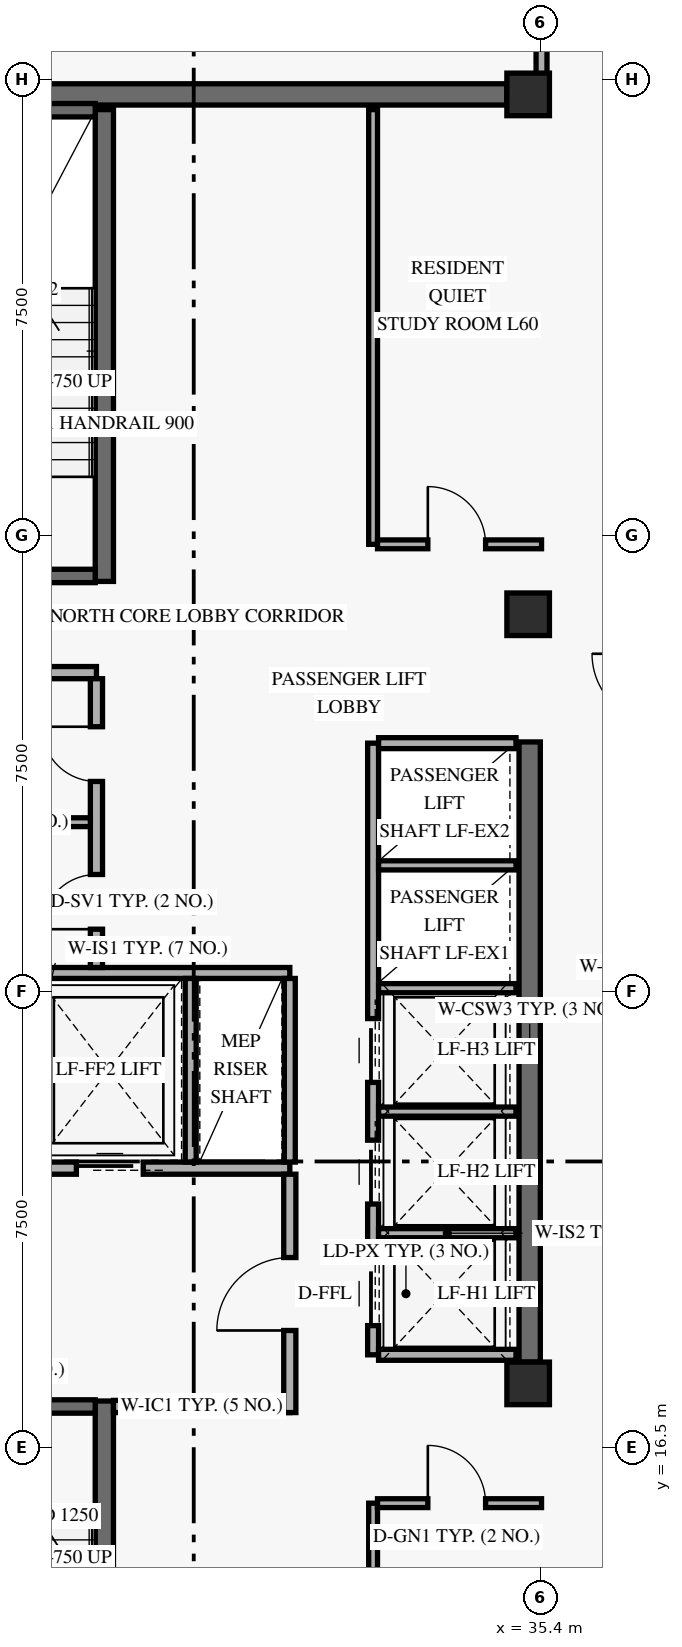
"""IFC4 building model, lengths in metres.
Left out: names, types, materials, properties, quantities, classifications, styles, units other than length and angle.
Written with IfcOpenShell. Run it as: python <this file> out.ifc"""

import sys

from ifc_helpers import new_model, si_unit, direction, frame, frame_2d, origin, origin_2d, place, context, subcontext, project, spatial, rectangle, extrude, element, fill, save


model = new_model("IFC4")
c1 = context("Model", 3, precision=1e-05, world=origin(), true_north=direction((0.0, 1.0)))
c2 = subcontext(c1, "Body", "Model", "MODEL_VIEW")
j1 = project(units=[si_unit("LENGTHUNIT", "METRE"), si_unit("PLANEANGLEUNIT", "RADIAN")], contexts=[c1])
p1 = place(None, origin())
s1 = spatial("IfcSite", under=j1, at=p1, CompositionType="ELEMENT")
p2 = place(p1, origin())
s2 = spatial("IfcBuilding", under=s1, at=p2, CompositionType="ELEMENT")
p3 = place(p2, frame((0.0, 0.0, 231.0)))
s3 = spatial("IfcBuildingStorey", under=s2, at=p3, CompositionType="ELEMENT", Elevation=231.0)
p4 = place(p3, frame((35.225, 17.9, 0.0), z_axis=(0.0, 0.0, 1.0), x_axis=(0.0, 1.0, 0.0)))
e1 = element("IfcWall", 1, at=p4, inside=s3, PredefinedType="SHEAR", context=c2, shape_type="SweptSolid", body=[
    extrude(rectangle(XDim=10.2, YDim=0.35, at=frame_2d((5.1, 0.0))), origin(), (0.0, 0.0, 1.0), 3.421),
])
p5 = place(p3, frame((24.55, 38.75, 0.0), z_axis=(0.0, 0.0, 1.0), x_axis=(1.0, 0.0, 0.0)))
e2 = element("IfcWall", 2, at=p5, inside=s3, PredefinedType="SHEAR", context=c2, shape_type="SweptSolid", body=[
    extrude(rectangle(XDim=10.3, YDim=0.35, at=frame_2d((5.15, 0.0))), origin(), (0.0, 0.0, 1.0), 3.96),
])
p6 = place(p3, frame((28.23, 9.5, 0.0), z_axis=(0.0, 0.0, 1.0), x_axis=(0.0, 1.0, 0.0)))
e3 = element("IfcWall", 3, at=p6, inside=s3, PredefinedType="SHEAR", context=c2, shape_type="SweptSolid", body=[
    extrude(rectangle(XDim=7.76, YDim=0.3, at=frame_2d((3.88, 0.0))), origin(), (0.0, 0.0, 1.0), 3.96),
])
p7 = place(p3, frame((24.92, 17.17, 0.0), z_axis=(0.0, 0.0, 1.0), x_axis=(1.0, 0.0, 0.0)))
e4 = element("IfcWall", 4, at=p7, inside=s3, PredefinedType="SHEAR", context=c2, shape_type="SweptSolid", body=[
    extrude(rectangle(XDim=3.16, YDim=0.22, at=frame_2d((1.58, 0.0))), origin(), (0.0, 0.0, 1.0), 3.96),
])
p8 = place(p7, frame((0.78, 0.0, 0.0)))
e5 = element("IfcOpeningElement", 5, at=p8, cuts=e4, PredefinedType="OPENING", context=c2, shape_type="SweptSolid", body=[
    extrude(rectangle(XDim=1.05, YDim=2.15, at=frame_2d((0.525, 1.075))), frame((0.0, 0.12, 0.0), z_axis=(0.0, -1.0, 0.0), x_axis=(1.0, 0.0, 0.0)), (0.0, 0.0, 1.0), 0.24),
])
p9 = place(p3, frame((28.23, 30.74, 0.0), z_axis=(0.0, 0.0, 1.0), x_axis=(0.0, 1.0, 0.0)))
e6 = element("IfcWall", 6, at=p9, inside=s3, PredefinedType="SHEAR", context=c2, shape_type="SweptSolid", body=[
    extrude(rectangle(XDim=7.76, YDim=0.3, at=frame_2d((3.88, 0.0))), origin(), (0.0, 0.0, 1.0), 3.96),
])
p10 = place(p3, frame((24.92, 30.83, 0.0), z_axis=(0.0, 0.0, 1.0), x_axis=(1.0, 0.0, 0.0)))
e7 = element("IfcWall", 7, at=p10, inside=s3, PredefinedType="SHEAR", context=c2, shape_type="SweptSolid", body=[
    extrude(rectangle(XDim=3.16, YDim=0.22, at=frame_2d((1.58, 0.0))), origin(), (0.0, 0.0, 1.0), 3.96),
])
p11 = place(p10, frame((0.78, 0.0, 0.0)))
e8 = element("IfcOpeningElement", 8, at=p11, cuts=e7, PredefinedType="OPENING", context=c2, shape_type="SweptSolid", body=[
    extrude(rectangle(XDim=1.05, YDim=2.15, at=frame_2d((0.525, 1.075))), frame((0.0, 0.12, 0.0), z_axis=(0.0, -1.0, 0.0), x_axis=(1.0, 0.0, 0.0)), (0.0, 0.0, 1.0), 0.24),
])
p12 = place(p3, frame((24.92, 38.49, 0.0), z_axis=(0.0, 0.0, 1.0), x_axis=(1.0, 0.0, 0.0)))
e9 = element("IfcWall", 9, at=p12, inside=s3, PredefinedType="SHEAR", context=c2, shape_type="SweptSolid", body=[
    extrude(rectangle(XDim=3.16, YDim=0.22, at=frame_2d((1.58, 0.0))), origin(), (0.0, 0.0, 1.0), 3.96),
])
for number, where, z_axis, x_axis in (
    (10, (35.2, 17.55, 0.0), (0.0, 0.0, 1.0), (1.0, 0.0, 0.0)),
    (11, (35.2, 30.2, 0.0), (0.0, 0.0, 1.0), (1.0, 0.0, 0.0)),
    (12, (35.2, 38.75, 0.0), (0.0, 0.0, 1.0), (1.0, 0.0, 0.0)),
):
    element("IfcColumn", number, at=place(p3, frame(where, z_axis=z_axis, x_axis=x_axis)), inside=s3, PredefinedType="COLUMN", context=c2, shape_type="SweptSolid", body=[
        extrude(rectangle(XDim=0.7, YDim=0.7, at=origin_2d()), origin(), (0.0, 0.0, 1.0), 4.2),
    ])
p13 = place(p3, frame((24.45, 21.09, 0.0), z_axis=(0.0, 0.0, 1.0), x_axis=(1.0, 0.0, 0.0)))
e13 = element("IfcWall", 13, at=p13, inside=s3, PredefinedType="STANDARD", context=c2, shape_type="SweptSolid", body=[
    extrude(rectangle(XDim=6.83, YDim=0.2, at=frame_2d((3.415, 0.0))), origin(), (0.0, 0.0, 1.0), 3.96),
])
p14 = place(p13, frame((0.72, 0.0, 0.0)))
e14 = element("IfcOpeningElement", 14, at=p14, cuts=e13, PredefinedType="OPENING", context=c2, shape_type="SweptSolid", body=[
    extrude(rectangle(XDim=1.1, YDim=2.2, at=frame_2d((0.55, 1.1))), frame((0.0, 0.11, 0.0), z_axis=(0.0, -1.0, 0.0), x_axis=(1.0, 0.0, 0.0)), (0.0, 0.0, 1.0), 0.22),
])
p15 = place(p13, frame((3.32, 0.0, 0.0)))
e15 = element("IfcOpeningElement", 15, at=p15, cuts=e13, PredefinedType="OPENING", context=c2, shape_type="SweptSolid", body=[
    extrude(rectangle(XDim=1.1, YDim=2.2, at=frame_2d((0.55, 1.1))), frame((0.0, 0.11, 0.0), z_axis=(0.0, -1.0, 0.0), x_axis=(1.0, 0.0, 0.0)), (0.0, 0.0, 1.0), 0.22),
])
p16 = place(p3, frame((28.38, 17.17, 0.0), z_axis=(0.0, 0.0, 1.0), x_axis=(1.0, 0.0, 0.0)))
e16 = element("IfcWall", 16, at=p16, inside=s3, PredefinedType="STANDARD", context=c2, shape_type="SweptSolid", body=[
    extrude(rectangle(XDim=2.9, YDim=0.2, at=frame_2d((1.45, 0.0))), origin(), (0.0, 0.0, 1.0), 3.96),
])
p17 = place(p3, frame((31.28, 17.07, 0.0), z_axis=(0.0, 0.0, 1.0), x_axis=(0.0, 1.0, 0.0)))
e17 = element("IfcWall", 17, at=p17, inside=s3, PredefinedType="STANDARD", context=c2, shape_type="SweptSolid", body=[
    extrude(rectangle(XDim=3.92, YDim=0.2, at=frame_2d((1.96, 0.0))), origin(), (0.0, 0.0, 1.0), 3.403),
])
p18 = place(p17, frame((1.35, 0.0, 0.0)))
e18 = element("IfcOpeningElement", 18, at=p18, cuts=e17, PredefinedType="OPENING", context=c2, shape_type="SweptSolid", body=[
    extrude(rectangle(XDim=1.2, YDim=2.15, at=frame_2d((0.6, 1.075))), frame((0.0, 0.11, 0.0), z_axis=(0.0, -1.0, 0.0), x_axis=(1.0, 0.0, 0.0)), (0.0, 0.0, 1.0), 0.22),
])
p19 = place(p3, frame((24.45, 24.3, 0.0), z_axis=(0.0, 0.0, 1.0), x_axis=(1.0, 0.0, 0.0)))
e19 = element("IfcWall", 19, at=p19, inside=s3, PredefinedType="STANDARD", context=c2, shape_type="SweptSolid", body=[
    extrude(rectangle(XDim=6.83, YDim=0.18, at=frame_2d((3.415, 0.0))), origin(), (0.0, 0.0, 1.0), 3.96),
])
for number, where, z_axis, x_axis in (
    (20, (29.65, 21.19, 0.0), (0.0, 0.0, 1.0), (0.0, 1.0, 0.0)),
    (21, (31.28, 21.19, 0.0), (0.0, 0.0, 1.0), (0.0, 1.0, 0.0)),
):
    element("IfcWall", number, at=place(p3, frame(where, z_axis=z_axis, x_axis=x_axis)), inside=s3, PredefinedType="STANDARD", context=c2, shape_type="SweptSolid", body=[
        extrude(rectangle(XDim=3.02, YDim=0.18, at=frame_2d((1.51, 0.0))), origin(), (0.0, 0.0, 1.0), 3.96),
    ])
p20 = place(p3, frame((24.45, 29.24, 0.0), z_axis=(0.0, 0.0, 1.0), x_axis=(1.0, 0.0, 0.0)))
e22 = element("IfcWall", 22, at=p20, inside=s3, PredefinedType="STANDARD", context=c2, shape_type="SweptSolid", body=[
    extrude(rectangle(XDim=3.65, YDim=0.2, at=frame_2d((1.825, 0.0))), origin(), (0.0, 0.0, 1.0), 3.96),
])
p21 = place(p3, frame((28.1, 24.39, 0.0), z_axis=(0.0, 0.0, 1.0), x_axis=(0.0, 1.0, 0.0)))
e23 = element("IfcWall", 23, at=p21, inside=s3, PredefinedType="STANDARD", context=c2, shape_type="SweptSolid", body=[
    extrude(rectangle(XDim=4.75, YDim=0.2, at=frame_2d((2.375, 0.0))), origin(), (0.0, 0.0, 1.0), 3.96),
])
p22 = place(p21, frame((0.63, 0.0, 0.0)))
e24 = element("IfcOpeningElement", 24, at=p22, cuts=e23, PredefinedType="OPENING", context=c2, shape_type="SweptSolid", body=[
    extrude(rectangle(XDim=0.9, YDim=2.1, at=frame_2d((0.45, 1.05))), frame((0.0, 0.11, 0.0), z_axis=(0.0, -1.0, 0.0), x_axis=(1.0, 0.0, 0.0)), (0.0, 0.0, 1.0), 0.22),
])
p23 = place(p21, frame((3.06, 0.0, 0.0)))
e25 = element("IfcOpeningElement", 25, at=p23, cuts=e23, PredefinedType="OPENING", context=c2, shape_type="SweptSolid", body=[
    extrude(rectangle(XDim=0.9, YDim=2.1, at=frame_2d((0.45, 1.05))), frame((0.0, 0.11, 0.0), z_axis=(0.0, -1.0, 0.0), x_axis=(1.0, 0.0, 0.0)), (0.0, 0.0, 1.0), 0.22),
])
p24 = place(p3, frame((24.45, 26.78, 0.0), z_axis=(0.0, 0.0, 1.0), x_axis=(1.0, 0.0, 0.0)))
e26 = element("IfcWall", 26, at=p24, inside=s3, PredefinedType="PARTITIONING", context=c2, shape_type="SweptSolid", body=[
    extrude(rectangle(XDim=3.55, YDim=0.145, at=frame_2d((1.775, 0.0))), origin(), (0.0, 0.0, 1.0), 3.96),
])
p25 = place(p3, frame((32.65, 18.02, 0.0), z_axis=(0.0, 0.0, 1.0), x_axis=(0.0, 1.0, 0.0)))
e27 = element("IfcWall", 27, at=p25, inside=s3, PredefinedType="STANDARD", context=c2, shape_type="SweptSolid", body=[
    extrude(rectangle(XDim=10.06, YDim=0.18, at=frame_2d((5.03, 0.0))), origin(), (0.0, 0.0, 1.0), 3.96),
])
p26 = place(p25, frame((0.48, 0.0, 0.0)))
e28 = element("IfcOpeningElement", 28, at=p26, cuts=e27, PredefinedType="OPENING", context=c2, shape_type="SweptSolid", body=[
    extrude(rectangle(XDim=1.05, YDim=2.2, at=frame_2d((0.525, 1.1))), frame((0.0, 0.1, 0.0), z_axis=(0.0, -1.0, 0.0), x_axis=(1.0, 0.0, 0.0)), (0.0, 0.0, 1.0), 0.2),
])
p27 = place(p25, frame((2.48, 0.0, 0.0)))
e29 = element("IfcOpeningElement", 29, at=p27, cuts=e27, PredefinedType="OPENING", context=c2, shape_type="SweptSolid", body=[
    extrude(rectangle(XDim=1.05, YDim=2.2, at=frame_2d((0.525, 1.1))), frame((0.0, 0.1, 0.0), z_axis=(0.0, -1.0, 0.0), x_axis=(1.0, 0.0, 0.0)), (0.0, 0.0, 1.0), 0.2),
])
p28 = place(p25, frame((4.48, 0.0, 0.0)))
e30 = element("IfcOpeningElement", 30, at=p28, cuts=e27, PredefinedType="OPENING", context=c2, shape_type="SweptSolid", body=[
    extrude(rectangle(XDim=1.05, YDim=2.2, at=frame_2d((0.525, 1.1))), frame((0.0, 0.1, 0.0), z_axis=(0.0, -1.0, 0.0), x_axis=(1.0, 0.0, 0.0)), (0.0, 0.0, 1.0), 0.2),
])
for number, where, z_axis, x_axis in (
    (31, (32.74, 18.02, 0.0), (0.0, 0.0, 1.0), (1.0, 0.0, 0.0)),
    (32, (32.74, 28.08, 0.0), (0.0, 0.0, 1.0), (1.0, 0.0, 0.0)),
):
    element("IfcWall", number, at=place(p3, frame(where, z_axis=z_axis, x_axis=x_axis)), inside=s3, PredefinedType="STANDARD", context=c2, shape_type="SweptSolid", body=[
        extrude(rectangle(XDim=2.26, YDim=0.18, at=frame_2d((1.13, 0.0))), origin(), (0.0, 0.0, 1.0), 3.96),
    ])
for number, where, z_axis, x_axis in (
    (33, (32.74, 20.02, 0.0), (0.0, 0.0, 1.0), (1.0, 0.0, 0.0)),
    (34, (32.74, 22.02, 0.0), (0.0, 0.0, 1.0), (1.0, 0.0, 0.0)),
    (35, (32.74, 24.05, 0.0), (0.0, 0.0, 1.0), (1.0, 0.0, 0.0)),
    (36, (32.74, 26.07, 0.0), (0.0, 0.0, 1.0), (1.0, 0.0, 0.0)),
):
    element("IfcWall", number, at=place(p3, frame(where, z_axis=z_axis, x_axis=x_axis)), inside=s3, PredefinedType="STANDARD", context=c2, shape_type="SweptSolid", body=[
        extrude(rectangle(XDim=2.26, YDim=0.15, at=frame_2d((1.13, 0.0))), origin(), (0.0, 0.0, 1.0), 3.96),
    ])
p29 = place(p3, frame((35.42, 38.75, 0.0), z_axis=(0.0, 0.0, 1.0), x_axis=(0.0, 1.0, 0.0)))
e37 = element("IfcWall", 37, at=p29, inside=s3, PredefinedType="STANDARD", context=c2, shape_type="SweptSolid", body=[
    extrude(rectangle(XDim=3.48, YDim=0.18, at=frame_2d((1.74, 0.0))), origin(), (0.0, 0.0, 1.0), 3.403),
])
p30 = place(p29, frame((0.8, 0.0, 0.0)))
e38 = element("IfcOpeningElement", 38, at=p30, cuts=e37, PredefinedType="OPENING", context=c2, shape_type="SweptSolid", body=[
    extrude(rectangle(XDim=0.95, YDim=2.15, at=frame_2d((0.475, 1.075))), frame((0.0, 0.1, 0.0), z_axis=(0.0, -1.0, 0.0), x_axis=(1.0, 0.0, 0.0)), (0.0, 0.0, 1.0), 0.2),
])
p31 = place(p3, frame((32.65, 9.5, 0.0), z_axis=(0.0, 0.0, 1.0), x_axis=(0.0, 1.0, 0.0)))
e39 = element("IfcWall", 39, at=p31, inside=s3, PredefinedType="PARTITIONING", context=c2, shape_type="SweptSolid", body=[
    extrude(rectangle(XDim=6.08, YDim=0.145, at=frame_2d((3.04, 0.0))), origin(), (0.0, 0.0, 1.0), 3.96),
])
p32 = place(p3, frame((32.722, 15.58, 0.0), z_axis=(0.0, 0.0, 1.0), x_axis=(1.0, 0.0, 0.0)))
e40 = element("IfcWall", 40, at=p32, inside=s3, PredefinedType="PARTITIONING", context=c2, shape_type="SweptSolid", body=[
    extrude(rectangle(XDim=2.698, YDim=0.145, at=frame_2d((1.349, 0.0))), origin(), (0.0, 0.0, 1.0), 3.403),
])
p33 = place(p32, frame((0.827, 0.0, 0.0)))
e41 = element("IfcOpeningElement", 41, at=p33, cuts=e40, PredefinedType="OPENING", context=c2, shape_type="SweptSolid", body=[
    extrude(rectangle(XDim=0.95, YDim=2.15, at=frame_2d((0.475, 1.075))), frame((0.0, 0.083, 0.0), z_axis=(0.0, -1.0, 0.0), x_axis=(1.0, 0.0, 0.0)), (0.0, 0.0, 1.0), 0.165),
])
p34 = place(p3, frame((32.65, 31.35, 0.0), z_axis=(0.0, 0.0, 1.0), x_axis=(0.0, 1.0, 0.0)))
e42 = element("IfcWall", 42, at=p34, inside=s3, PredefinedType="PARTITIONING", context=c2, shape_type="SweptSolid", body=[
    extrude(rectangle(XDim=7.15, YDim=0.145, at=frame_2d((3.575, 0.0))), origin(), (0.0, 0.0, 1.0), 3.96),
])
p35 = place(p3, frame((32.722, 31.35, 0.0), z_axis=(0.0, 0.0, 1.0), x_axis=(1.0, 0.0, 0.0)))
e43 = element("IfcWall", 43, at=p35, inside=s3, PredefinedType="PARTITIONING", context=c2, shape_type="SweptSolid", body=[
    extrude(rectangle(XDim=2.698, YDim=0.145, at=frame_2d((1.349, 0.0))), origin(), (0.0, 0.0, 1.0), 3.403),
])
p36 = place(p35, frame((0.827, 0.0, 0.0)))
e44 = element("IfcOpeningElement", 44, at=p36, cuts=e43, PredefinedType="OPENING", context=c2, shape_type="SweptSolid", body=[
    extrude(rectangle(XDim=0.95, YDim=2.15, at=frame_2d((0.475, 1.075))), frame((0.0, 0.083, 0.0), z_axis=(0.0, -1.0, 0.0), x_axis=(1.0, 0.0, 0.0)), (0.0, 0.0, 1.0), 0.165),
])
p37 = place(p15, origin())
e45 = element("IfcDoor", 45, at=p37, inside=s3, OperationType="SLIDING_TO_LEFT", PredefinedType="DOOR", context=c2, shape_type="SweptSolid", body=[
    extrude(rectangle(XDim=1.1, YDim=2.2, at=frame_2d((0.55, 1.1))), frame((0.0, 0.025, 0.0), z_axis=(0.0, -1.0, 0.0), x_axis=(1.0, 0.0, 0.0)), (0.0, 0.0, 1.0), 0.05),
])
fill(e15, e45)
p38 = place(p18, origin())
e46 = element("IfcDoor", 46, at=p38, inside=s3, OperationType="SINGLE_SWING_LEFT", PredefinedType="DOOR", context=c2, shape_type="SweptSolid", body=[
    extrude(rectangle(XDim=1.2, YDim=2.15, at=frame_2d((0.6, 1.075))), frame((0.0, 0.025, 0.0), z_axis=(0.0, -1.0, 0.0), x_axis=(1.0, 0.0, 0.0)), (0.0, 0.0, 1.0), 0.05),
])
fill(e18, e46)
p39 = place(p22, origin())
e47 = element("IfcDoor", 47, at=p39, inside=s3, OperationType="SINGLE_SWING_LEFT", PredefinedType="DOOR", context=c2, shape_type="SweptSolid", body=[
    extrude(rectangle(XDim=0.9, YDim=2.1, at=frame_2d((0.45, 1.05))), frame((0.0, 0.025, 0.0), z_axis=(0.0, -1.0, 0.0), x_axis=(1.0, 0.0, 0.0)), (0.0, 0.0, 1.0), 0.05),
])
fill(e24, e47)
p40 = place(p23, origin())
e48 = element("IfcDoor", 48, at=p40, inside=s3, OperationType="SINGLE_SWING_RIGHT", PredefinedType="DOOR", context=c2, shape_type="SweptSolid", body=[
    extrude(rectangle(XDim=0.9, YDim=2.1, at=frame_2d((0.45, 1.05))), frame((0.0, 0.025, 0.0), z_axis=(0.0, -1.0, 0.0), x_axis=(1.0, 0.0, 0.0)), (0.0, 0.0, 1.0), 0.05),
])
fill(e25, e48)
p41 = place(p26, origin())
e49 = element("IfcDoor", 49, at=p41, inside=s3, OperationType="SLIDING_TO_LEFT", PredefinedType="DOOR", context=c2, shape_type="SweptSolid", body=[
    extrude(rectangle(XDim=1.05, YDim=2.2, at=frame_2d((0.525, 1.1))), frame((0.0, 0.025, 0.0), z_axis=(0.0, -1.0, 0.0), x_axis=(1.0, 0.0, 0.0)), (0.0, 0.0, 1.0), 0.05),
])
fill(e28, e49)
p42 = place(p27, origin())
e50 = element("IfcDoor", 50, at=p42, inside=s3, OperationType="SLIDING_TO_LEFT", PredefinedType="DOOR", context=c2, shape_type="SweptSolid", body=[
    extrude(rectangle(XDim=1.05, YDim=2.2, at=frame_2d((0.525, 1.1))), frame((0.0, 0.025, 0.0), z_axis=(0.0, -1.0, 0.0), x_axis=(1.0, 0.0, 0.0)), (0.0, 0.0, 1.0), 0.05),
])
fill(e29, e50)
p43 = place(p28, origin())
e51 = element("IfcDoor", 51, at=p43, inside=s3, OperationType="SLIDING_TO_LEFT", PredefinedType="DOOR", context=c2, shape_type="SweptSolid", body=[
    extrude(rectangle(XDim=1.05, YDim=2.2, at=frame_2d((0.525, 1.1))), frame((0.0, 0.025, 0.0), z_axis=(0.0, -1.0, 0.0), x_axis=(1.0, 0.0, 0.0)), (0.0, 0.0, 1.0), 0.05),
])
fill(e30, e51)
p44 = place(p33, origin())
e52 = element("IfcDoor", 52, at=p44, inside=s3, OperationType="SINGLE_SWING_LEFT", PredefinedType="DOOR", context=c2, shape_type="SweptSolid", body=[
    extrude(rectangle(XDim=0.95, YDim=2.15, at=frame_2d((0.475, 1.075))), frame((0.0, 0.025, 0.0), z_axis=(0.0, -1.0, 0.0), x_axis=(1.0, 0.0, 0.0)), (0.0, 0.0, 1.0), 0.05),
])
fill(e41, e52)
p45 = place(p36, origin())
e53 = element("IfcDoor", 53, at=p45, inside=s3, OperationType="SINGLE_SWING_LEFT", PredefinedType="DOOR", context=c2, shape_type="SweptSolid", body=[
    extrude(rectangle(XDim=0.95, YDim=2.15, at=frame_2d((0.475, 1.075))), frame((0.0, 0.025, 0.0), z_axis=(0.0, -1.0, 0.0), x_axis=(1.0, 0.0, 0.0)), (0.0, 0.0, 1.0), 0.05),
])
fill(e44, e53)
save(model, sys.argv[1])
